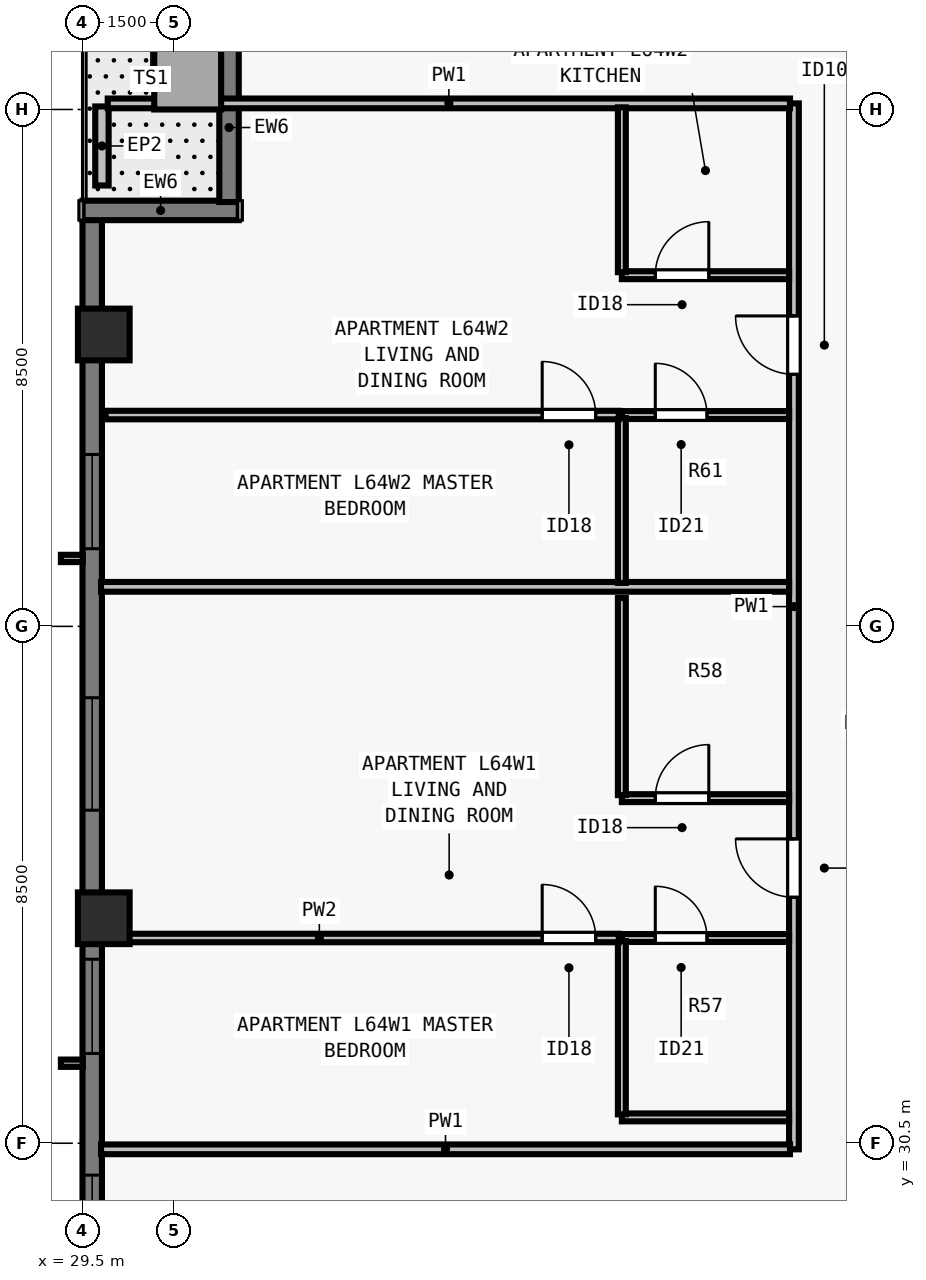
"""IFC4 building model, lengths in metres.
Left out: names, types, materials, properties, quantities, classifications, styles, units other than length and angle.
Written with IfcOpenShell. Run it as: python <this file> out.ifc"""

import sys

from ifc_helpers import new_model, si_unit, direction, frame, frame_2d, origin, origin_2d, place, context, subcontext, project, spatial, rectangle, extrude, element, fill, save


model = new_model("IFC4")
c1 = context("Model", 3, precision=1e-05, world=origin(), true_north=direction((0.0, 1.0)))
c2 = subcontext(c1, "Body", "Model", "MODEL_VIEW")
j1 = project(units=[si_unit("LENGTHUNIT", "METRE"), si_unit("PLANEANGLEUNIT", "RADIAN")], contexts=[c1])
p1 = place(None, origin())
s1 = spatial("IfcSite", under=j1, at=p1, CompositionType="ELEMENT")
p2 = place(p1, origin())
s2 = spatial("IfcBuilding", under=s1, at=p2, CompositionType="ELEMENT")
p3 = place(p2, frame((0.0, 0.0, 234.0)))
s3 = spatial("IfcBuildingStorey", under=s2, at=p3, CompositionType="ELEMENT", Elevation=234.0)
for number, where, z_axis, x_axis in (
    (1, (29.85, 43.8, 0.0), (0.0, 0.0, 1.0), (0.0, 1.0, 0.0)),
    (2, (29.85, 34.2, 0.0), (0.0, 0.0, 1.0), (0.0, 1.0, 0.0)),
):
    element("IfcColumn", number, at=place(p3, frame(where, z_axis=z_axis, x_axis=x_axis)), inside=s3, PredefinedType="COLUMN", context=c2, shape_type="SweptSolid", body=[
        extrude(rectangle(XDim=0.85, YDim=0.85, at=origin_2d()), origin(), (0.0, 0.0, 1.0), 3.5),
    ])
p4 = place(p3, frame((29.66, 21.5, 0.0), z_axis=(0.0, 0.0, 1.0), x_axis=(0.0, 1.0, 0.0)))
e3 = element("IfcWall", 3, at=p4, inside=s3, PredefinedType="SOLIDWALL", context=c2, shape_type="SweptSolid", body=[
    extrude(rectangle(XDim=24.202, YDim=0.32, at=frame_2d((12.101, 0.0))), origin(), (0.0, 0.0, 1.0), 3.29),
])
p5 = place(p4, frame((6.625, 0.0, 0.8)))
e4 = element("IfcOpeningElement", 4, at=p5, cuts=e3, PredefinedType="OPENING", context=c2, shape_type="SweptSolid", body=[
    extrude(rectangle(XDim=1.85, YDim=1.678, at=frame_2d((0.925, 0.839))), frame((0.0, 0.17, 0.0), z_axis=(0.0, -1.0, 0.0), x_axis=(1.0, 0.0, 0.0)), (0.0, 0.0, 1.0), 0.34),
])
p6 = place(p4, frame((10.476, 0.0, 0.8)))
e5 = element("IfcOpeningElement", 5, at=p6, cuts=e3, PredefinedType="OPENING", context=c2, shape_type="SweptSolid", body=[
    extrude(rectangle(XDim=1.55, YDim=1.678, at=frame_2d((0.775, 0.839))), frame((0.0, 0.17, 0.0), z_axis=(0.0, -1.0, 0.0), x_axis=(1.0, 0.0, 0.0)), (0.0, 0.0, 1.0), 0.34),
])
p7 = place(p4, frame((14.476, 0.0, 0.8)))
e6 = element("IfcOpeningElement", 6, at=p7, cuts=e3, PredefinedType="OPENING", context=c2, shape_type="SweptSolid", body=[
    extrude(rectangle(XDim=1.85, YDim=1.678, at=frame_2d((0.925, 0.839))), frame((0.0, 0.17, 0.0), z_axis=(0.0, -1.0, 0.0), x_axis=(1.0, 0.0, 0.0)), (0.0, 0.0, 1.0), 0.34),
])
p8 = place(p4, frame((18.777, 0.0, 0.8)))
e7 = element("IfcOpeningElement", 7, at=p8, cuts=e3, PredefinedType="OPENING", context=c2, shape_type="SweptSolid", body=[
    extrude(rectangle(XDim=1.55, YDim=1.678, at=frame_2d((0.775, 0.839))), frame((0.0, 0.17, 0.0), z_axis=(0.0, -1.0, 0.0), x_axis=(1.0, 0.0, 0.0)), (0.0, 0.0, 1.0), 0.34),
])
p9 = place(p3, frame((29.5, 45.84, 0.0), z_axis=(0.0, 0.0, 1.0), x_axis=(1.0, 0.0, 0.0)))
e8 = element("IfcWall", 8, at=p9, inside=s3, PredefinedType="SOLIDWALL", context=c2, shape_type="SweptSolid", body=[
    extrude(rectangle(XDim=2.57, YDim=0.32, at=frame_2d((1.285, 0.0))), origin(), (0.0, 0.0, 1.0), 3.29),
])
p10 = place(p3, frame((31.91, 45.978, 0.0), z_axis=(0.0, 0.0, 1.0), x_axis=(0.0, 1.0, 0.0)))
e9 = element("IfcWall", 9, at=p10, inside=s3, PredefinedType="SOLIDWALL", context=c2, shape_type="SweptSolid", body=[
    extrude(rectangle(XDim=5.742, YDim=0.32, at=frame_2d((2.871, 0.0))), origin(), (0.0, 0.0, 1.0), 3.29),
])
p11 = place(p10, frame((2.601, 0.0, 0.0)))
e10 = element("IfcOpeningElement", 10, at=p11, cuts=e9, PredefinedType="OPENING", context=c2, shape_type="SweptSolid", body=[
    extrude(rectangle(XDim=1.0, YDim=2.15, at=frame_2d((0.5, 1.075))), frame((0.0, 0.17, 0.0), z_axis=(0.0, -1.0, 0.0), x_axis=(1.0, 0.0, 0.0)), (0.0, 0.0, 1.0), 0.34),
])
p12 = place(p3, frame((29.82, 46.25, 0.0), z_axis=(0.0, 0.0, 1.0), x_axis=(0.0, 1.0, 0.0)))
e11 = element("IfcWall", 11, at=p12, inside=s3, PredefinedType="PARAPET", context=c2, shape_type="SweptSolid", body=[
    extrude(rectangle(XDim=1.3, YDim=0.22, at=frame_2d((0.65, 0.0))), origin(), (0.0, 0.0, 1.0), 0.55),
])
p13 = place(p3, frame((41.2, 30.4, 0.0), z_axis=(0.0, 0.0, 1.0), x_axis=(0.0, 1.0, 0.0)))
e12 = element("IfcWall", 12, at=p13, inside=s3, PredefinedType="PARTITIONING", context=c2, shape_type="SweptSolid", body=[
    extrude(rectangle(XDim=17.2, YDim=0.16, at=frame_2d((8.6, 0.0))), origin(), (0.0, 0.0, 1.0), 3.29),
])
p14 = place(p13, frame((4.145, 0.0, 0.0)))
e13 = element("IfcOpeningElement", 13, at=p14, cuts=e12, PredefinedType="OPENING", context=c2, shape_type="SweptSolid", body=[
    extrude(rectangle(XDim=0.96, YDim=2.18, at=frame_2d((0.48, 1.09))), frame((0.0, 0.09, 0.0), z_axis=(0.0, -1.0, 0.0), x_axis=(1.0, 0.0, 0.0)), (0.0, 0.0, 1.0), 0.18),
])
p15 = place(p13, frame((12.745, 0.0, 0.0)))
e14 = element("IfcOpeningElement", 14, at=p15, cuts=e12, PredefinedType="OPENING", context=c2, shape_type="SweptSolid", body=[
    extrude(rectangle(XDim=0.96, YDim=2.18, at=frame_2d((0.48, 1.09))), frame((0.0, 0.09, 0.0), z_axis=(0.0, -1.0, 0.0), x_axis=(1.0, 0.0, 0.0)), (0.0, 0.0, 1.0), 0.18),
])
p16 = place(p3, frame((29.805, 30.4, 0.0), z_axis=(0.0, 0.0, 1.0), x_axis=(1.0, 0.0, 0.0)))
e15 = element("IfcWall", 15, at=p16, inside=s3, PredefinedType="PARTITIONING", context=c2, shape_type="SweptSolid", body=[
    extrude(rectangle(XDim=11.33, YDim=0.16, at=frame_2d((5.665, 0.0))), origin(), (0.0, 0.0, 1.0), 3.29),
])
p17 = place(p3, frame((29.915, 47.6, 0.0), z_axis=(0.0, 0.0, 1.0), x_axis=(1.0, 0.0, 0.0)))
e16 = element("IfcWall", 16, at=p17, inside=s3, PredefinedType="PARTITIONING", context=c2, shape_type="SweptSolid", body=[
    extrude(rectangle(XDim=11.22, YDim=0.16, at=frame_2d((5.61, 0.0))), origin(), (0.0, 0.0, 1.0), 3.29),
])
p18 = place(p3, frame((29.805, 39.65, 0.0), z_axis=(0.0, 0.0, 1.0), x_axis=(1.0, 0.0, 0.0)))
e17 = element("IfcWall", 17, at=p18, inside=s3, PredefinedType="PARTITIONING", context=c2, shape_type="SweptSolid", body=[
    extrude(rectangle(XDim=11.315, YDim=0.16, at=frame_2d((5.658, 0.0))), origin(), (0.0, 0.0, 1.0), 2.958),
])
p19 = place(p3, frame((38.37, 30.925, 0.0), z_axis=(0.0, 0.0, 1.0), x_axis=(1.0, 0.0, 0.0)))
e18 = element("IfcWall", 18, at=p19, inside=s3, PredefinedType="PLUMBINGWALL", context=c2, shape_type="SweptSolid", body=[
    extrude(rectangle(XDim=2.75, YDim=0.13, at=frame_2d((1.375, 0.0))), origin(), (0.0, 0.0, 1.0), 3.29),
])
p20 = place(p3, frame((38.37, 33.875, 0.0), z_axis=(0.0, 0.0, 1.0), x_axis=(1.0, 0.0, 0.0)))
e19 = element("IfcWall", 19, at=p20, inside=s3, PredefinedType="PLUMBINGWALL", context=c2, shape_type="SweptSolid", body=[
    extrude(rectangle(XDim=2.75, YDim=0.13, at=frame_2d((1.375, 0.0))), origin(), (0.0, 0.0, 1.0), 3.29),
])
p21 = place(p20, frame((0.55, 0.0, 0.0)))
e20 = element("IfcOpeningElement", 20, at=p21, cuts=e19, PredefinedType="OPENING", context=c2, shape_type="SweptSolid", body=[
    extrude(rectangle(XDim=0.85, YDim=2.08, at=frame_2d((0.425, 1.04))), frame((0.0, 0.075, 0.0), z_axis=(0.0, -1.0, 0.0), x_axis=(1.0, 0.0, 0.0)), (0.0, 0.0, 1.0), 0.15),
])
p22 = place(p3, frame((38.37, 30.975, 0.0), z_axis=(0.0, 0.0, 1.0), x_axis=(0.0, 1.0, 0.0)))
e21 = element("IfcWall", 21, at=p22, inside=s3, PredefinedType="PLUMBINGWALL", context=c2, shape_type="SweptSolid", body=[
    extrude(rectangle(XDim=2.85, YDim=0.13, at=frame_2d((1.425, 0.0))), origin(), (0.0, 0.0, 1.0), 3.29),
])
p23 = place(p3, frame((38.37, 36.175, 0.0), z_axis=(0.0, 0.0, 1.0), x_axis=(1.0, 0.0, 0.0)))
e22 = element("IfcWall", 22, at=p23, inside=s3, PredefinedType="PLUMBINGWALL", context=c2, shape_type="SweptSolid", body=[
    extrude(rectangle(XDim=2.75, YDim=0.13, at=frame_2d((1.375, 0.0))), origin(), (0.0, 0.0, 1.0), 3.29),
])
p24 = place(p23, frame((0.55, 0.0, 0.0)))
e23 = element("IfcOpeningElement", 23, at=p24, cuts=e22, PredefinedType="OPENING", context=c2, shape_type="SweptSolid", body=[
    extrude(rectangle(XDim=0.88, YDim=2.1, at=frame_2d((0.44, 1.05))), frame((0.0, 0.075, 0.0), z_axis=(0.0, -1.0, 0.0), x_axis=(1.0, 0.0, 0.0)), (0.0, 0.0, 1.0), 0.15),
])
p25 = place(p3, frame((38.37, 36.225, 0.0), z_axis=(0.0, 0.0, 1.0), x_axis=(0.0, 1.0, 0.0)))
e24 = element("IfcWall", 24, at=p25, inside=s3, PredefinedType="PLUMBINGWALL", context=c2, shape_type="SweptSolid", body=[
    extrude(rectangle(XDim=3.24, YDim=0.13, at=frame_2d((1.62, 0.0))), origin(), (0.0, 0.0, 1.0), 3.29),
])
p26 = place(p3, frame((29.88, 33.875, 0.0), z_axis=(0.0, 0.0, 1.0), x_axis=(1.0, 0.0, 0.0)))
e25 = element("IfcWall", 25, at=p26, inside=s3, PredefinedType="PARTITIONING", context=c2, shape_type="SweptSolid", body=[
    extrude(rectangle(XDim=8.44, YDim=0.14, at=frame_2d((4.22, 0.0))), origin(), (0.0, 0.0, 1.0), 2.573),
])
p27 = place(p26, frame((7.18, 0.0, 0.0)))
e26 = element("IfcOpeningElement", 26, at=p27, cuts=e25, PredefinedType="OPENING", context=c2, shape_type="SweptSolid", body=[
    extrude(rectangle(XDim=0.88, YDim=2.1, at=frame_2d((0.44, 1.05))), frame((0.0, 0.08, 0.0), z_axis=(0.0, -1.0, 0.0), x_axis=(1.0, 0.0, 0.0)), (0.0, 0.0, 1.0), 0.16),
])
p28 = place(p3, frame((38.37, 42.475, 0.0), z_axis=(0.0, 0.0, 1.0), x_axis=(1.0, 0.0, 0.0)))
e27 = element("IfcWall", 27, at=p28, inside=s3, PredefinedType="PLUMBINGWALL", context=c2, shape_type="SweptSolid", body=[
    extrude(rectangle(XDim=2.75, YDim=0.13, at=frame_2d((1.375, 0.0))), origin(), (0.0, 0.0, 1.0), 2.958),
])
p29 = place(p28, frame((0.55, 0.0, 0.0)))
e28 = element("IfcOpeningElement", 28, at=p29, cuts=e27, PredefinedType="OPENING", context=c2, shape_type="SweptSolid", body=[
    extrude(rectangle(XDim=0.85, YDim=2.08, at=frame_2d((0.425, 1.04))), frame((0.0, 0.075, 0.0), z_axis=(0.0, -1.0, 0.0), x_axis=(1.0, 0.0, 0.0)), (0.0, 0.0, 1.0), 0.15),
])
p30 = place(p3, frame((38.37, 39.715, 0.0), z_axis=(0.0, 0.0, 1.0), x_axis=(0.0, 1.0, 0.0)))
e29 = element("IfcWall", 29, at=p30, inside=s3, PredefinedType="PLUMBINGWALL", context=c2, shape_type="SweptSolid", body=[
    extrude(rectangle(XDim=2.71, YDim=0.13, at=frame_2d((1.355, 0.0))), origin(), (0.0, 0.0, 1.0), 3.29),
])
p31 = place(p3, frame((38.37, 44.775, 0.0), z_axis=(0.0, 0.0, 1.0), x_axis=(1.0, 0.0, 0.0)))
e30 = element("IfcWall", 30, at=p31, inside=s3, PredefinedType="PLUMBINGWALL", context=c2, shape_type="SweptSolid", body=[
    extrude(rectangle(XDim=2.75, YDim=0.13, at=frame_2d((1.375, 0.0))), origin(), (0.0, 0.0, 1.0), 2.958),
])
p32 = place(p31, frame((0.55, 0.0, 0.0)))
e31 = element("IfcOpeningElement", 31, at=p32, cuts=e30, PredefinedType="OPENING", context=c2, shape_type="SweptSolid", body=[
    extrude(rectangle(XDim=0.88, YDim=2.1, at=frame_2d((0.44, 1.05))), frame((0.0, 0.075, 0.0), z_axis=(0.0, -1.0, 0.0), x_axis=(1.0, 0.0, 0.0)), (0.0, 0.0, 1.0), 0.15),
])
p33 = place(p3, frame((38.37, 44.825, 0.0), z_axis=(0.0, 0.0, 1.0), x_axis=(0.0, 1.0, 0.0)))
e32 = element("IfcWall", 32, at=p33, inside=s3, PredefinedType="PLUMBINGWALL", context=c2, shape_type="SweptSolid", body=[
    extrude(rectangle(XDim=2.71, YDim=0.13, at=frame_2d((1.355, 0.0))), origin(), (0.0, 0.0, 1.0), 3.29),
])
p34 = place(p3, frame((29.88, 42.475, 0.0), z_axis=(0.0, 0.0, 1.0), x_axis=(1.0, 0.0, 0.0)))
e33 = element("IfcWall", 33, at=p34, inside=s3, PredefinedType="PARTITIONING", context=c2, shape_type="SweptSolid", body=[
    extrude(rectangle(XDim=8.44, YDim=0.14, at=frame_2d((4.22, 0.0))), origin(), (0.0, 0.0, 1.0), 3.29),
])
p35 = place(p34, frame((7.18, 0.0, 0.0)))
e34 = element("IfcOpeningElement", 34, at=p35, cuts=e33, PredefinedType="OPENING", context=c2, shape_type="SweptSolid", body=[
    extrude(rectangle(XDim=0.88, YDim=2.1, at=frame_2d((0.44, 1.05))), frame((0.0, 0.08, 0.0), z_axis=(0.0, -1.0, 0.0), x_axis=(1.0, 0.0, 0.0)), (0.0, 0.0, 1.0), 0.16),
])
p36 = place(p5, origin())
e35 = element("IfcWindow", 35, at=p36, inside=s3, PartitioningType="SINGLE_PANEL", PredefinedType="WINDOW", context=c2, shape_type="SweptSolid", body=[
    extrude(rectangle(XDim=1.85, YDim=1.678, at=frame_2d((0.925, 0.839))), frame((0.0, -0.05, 0.0), z_axis=(0.0, -1.0, 0.0), x_axis=(1.0, 0.0, 0.0)), (0.0, 0.0, 1.0), 0.06),
])
fill(e4, e35)
p37 = place(p6, origin())
e36 = element("IfcWindow", 36, at=p37, inside=s3, PartitioningType="SINGLE_PANEL", PredefinedType="WINDOW", context=c2, shape_type="SweptSolid", body=[
    extrude(rectangle(XDim=1.55, YDim=1.678, at=frame_2d((0.775, 0.839))), frame((0.0, -0.05, 0.0), z_axis=(0.0, -1.0, 0.0), x_axis=(1.0, 0.0, 0.0)), (0.0, 0.0, 1.0), 0.06),
])
fill(e5, e36)
p38 = place(p7, origin())
e37 = element("IfcWindow", 37, at=p38, inside=s3, PartitioningType="SINGLE_PANEL", PredefinedType="WINDOW", context=c2, shape_type="SweptSolid", body=[
    extrude(rectangle(XDim=1.85, YDim=1.678, at=frame_2d((0.925, 0.839))), frame((0.0, -0.05, 0.0), z_axis=(0.0, -1.0, 0.0), x_axis=(1.0, 0.0, 0.0)), (0.0, 0.0, 1.0), 0.06),
])
fill(e6, e37)
p39 = place(p8, origin())
e38 = element("IfcWindow", 38, at=p39, inside=s3, PartitioningType="SINGLE_PANEL", PredefinedType="WINDOW", context=c2, shape_type="SweptSolid", body=[
    extrude(rectangle(XDim=1.55, YDim=1.678, at=frame_2d((0.775, 0.839))), frame((0.0, -0.05, 0.0), z_axis=(0.0, -1.0, 0.0), x_axis=(1.0, 0.0, 0.0)), (0.0, 0.0, 1.0), 0.06),
])
fill(e7, e38)
p40 = place(p21, origin())
e39 = element("IfcDoor", 39, at=p40, inside=s3, OperationType="SINGLE_SWING_LEFT", PredefinedType="DOOR", context=c2, shape_type="SweptSolid", body=[
    extrude(rectangle(XDim=0.85, YDim=2.08, at=frame_2d((0.425, 1.04))), frame((0.0, 0.025, 0.0), z_axis=(0.0, -1.0, 0.0), x_axis=(1.0, 0.0, 0.0)), (0.0, 0.0, 1.0), 0.05),
])
fill(e20, e39)
p41 = place(p24, origin())
e40 = element("IfcDoor", 40, at=p41, inside=s3, OperationType="SINGLE_SWING_RIGHT", PredefinedType="DOOR", context=c2, shape_type="SweptSolid", body=[
    extrude(rectangle(XDim=0.88, YDim=2.1, at=frame_2d((0.44, 1.05))), frame((0.0, 0.025, 0.0), z_axis=(0.0, -1.0, 0.0), x_axis=(1.0, 0.0, 0.0)), (0.0, 0.0, 1.0), 0.05),
])
fill(e23, e40)
p42 = place(p27, origin())
e41 = element("IfcDoor", 41, at=p42, inside=s3, OperationType="SINGLE_SWING_LEFT", PredefinedType="DOOR", context=c2, shape_type="SweptSolid", body=[
    extrude(rectangle(XDim=0.88, YDim=2.1, at=frame_2d((0.44, 1.05))), frame((0.0, 0.025, 0.0), z_axis=(0.0, -1.0, 0.0), x_axis=(1.0, 0.0, 0.0)), (0.0, 0.0, 1.0), 0.05),
])
fill(e26, e41)
p43 = place(p14, origin())
e42 = element("IfcDoor", 42, at=p43, inside=s3, OperationType="SINGLE_SWING_RIGHT", PredefinedType="DOOR", context=c2, shape_type="SweptSolid", body=[
    extrude(rectangle(XDim=0.96, YDim=2.18, at=frame_2d((0.48, 1.09))), frame((0.0, 0.025, 0.0), z_axis=(0.0, -1.0, 0.0), x_axis=(1.0, 0.0, 0.0)), (0.0, 0.0, 1.0), 0.05),
])
fill(e13, e42)
p44 = place(p29, origin())
e43 = element("IfcDoor", 43, at=p44, inside=s3, OperationType="SINGLE_SWING_LEFT", PredefinedType="DOOR", context=c2, shape_type="SweptSolid", body=[
    extrude(rectangle(XDim=0.85, YDim=2.08, at=frame_2d((0.425, 1.04))), frame((0.0, 0.025, 0.0), z_axis=(0.0, -1.0, 0.0), x_axis=(1.0, 0.0, 0.0)), (0.0, 0.0, 1.0), 0.05),
])
fill(e28, e43)
p45 = place(p32, origin())
e44 = element("IfcDoor", 44, at=p45, inside=s3, OperationType="SINGLE_SWING_RIGHT", PredefinedType="DOOR", context=c2, shape_type="SweptSolid", body=[
    extrude(rectangle(XDim=0.88, YDim=2.1, at=frame_2d((0.44, 1.05))), frame((0.0, 0.025, 0.0), z_axis=(0.0, -1.0, 0.0), x_axis=(1.0, 0.0, 0.0)), (0.0, 0.0, 1.0), 0.05),
])
fill(e31, e44)
p46 = place(p35, origin())
e45 = element("IfcDoor", 45, at=p46, inside=s3, OperationType="SINGLE_SWING_LEFT", PredefinedType="DOOR", context=c2, shape_type="SweptSolid", body=[
    extrude(rectangle(XDim=0.88, YDim=2.1, at=frame_2d((0.44, 1.05))), frame((0.0, 0.025, 0.0), z_axis=(0.0, -1.0, 0.0), x_axis=(1.0, 0.0, 0.0)), (0.0, 0.0, 1.0), 0.05),
])
fill(e34, e45)
p47 = place(p15, origin())
e46 = element("IfcDoor", 46, at=p47, inside=s3, OperationType="SINGLE_SWING_RIGHT", PredefinedType="DOOR", context=c2, shape_type="SweptSolid", body=[
    extrude(rectangle(XDim=0.96, YDim=2.18, at=frame_2d((0.48, 1.09))), frame((0.0, 0.025, 0.0), z_axis=(0.0, -1.0, 0.0), x_axis=(1.0, 0.0, 0.0)), (0.0, 0.0, 1.0), 0.05),
])
fill(e14, e46)
save(model, sys.argv[1])
